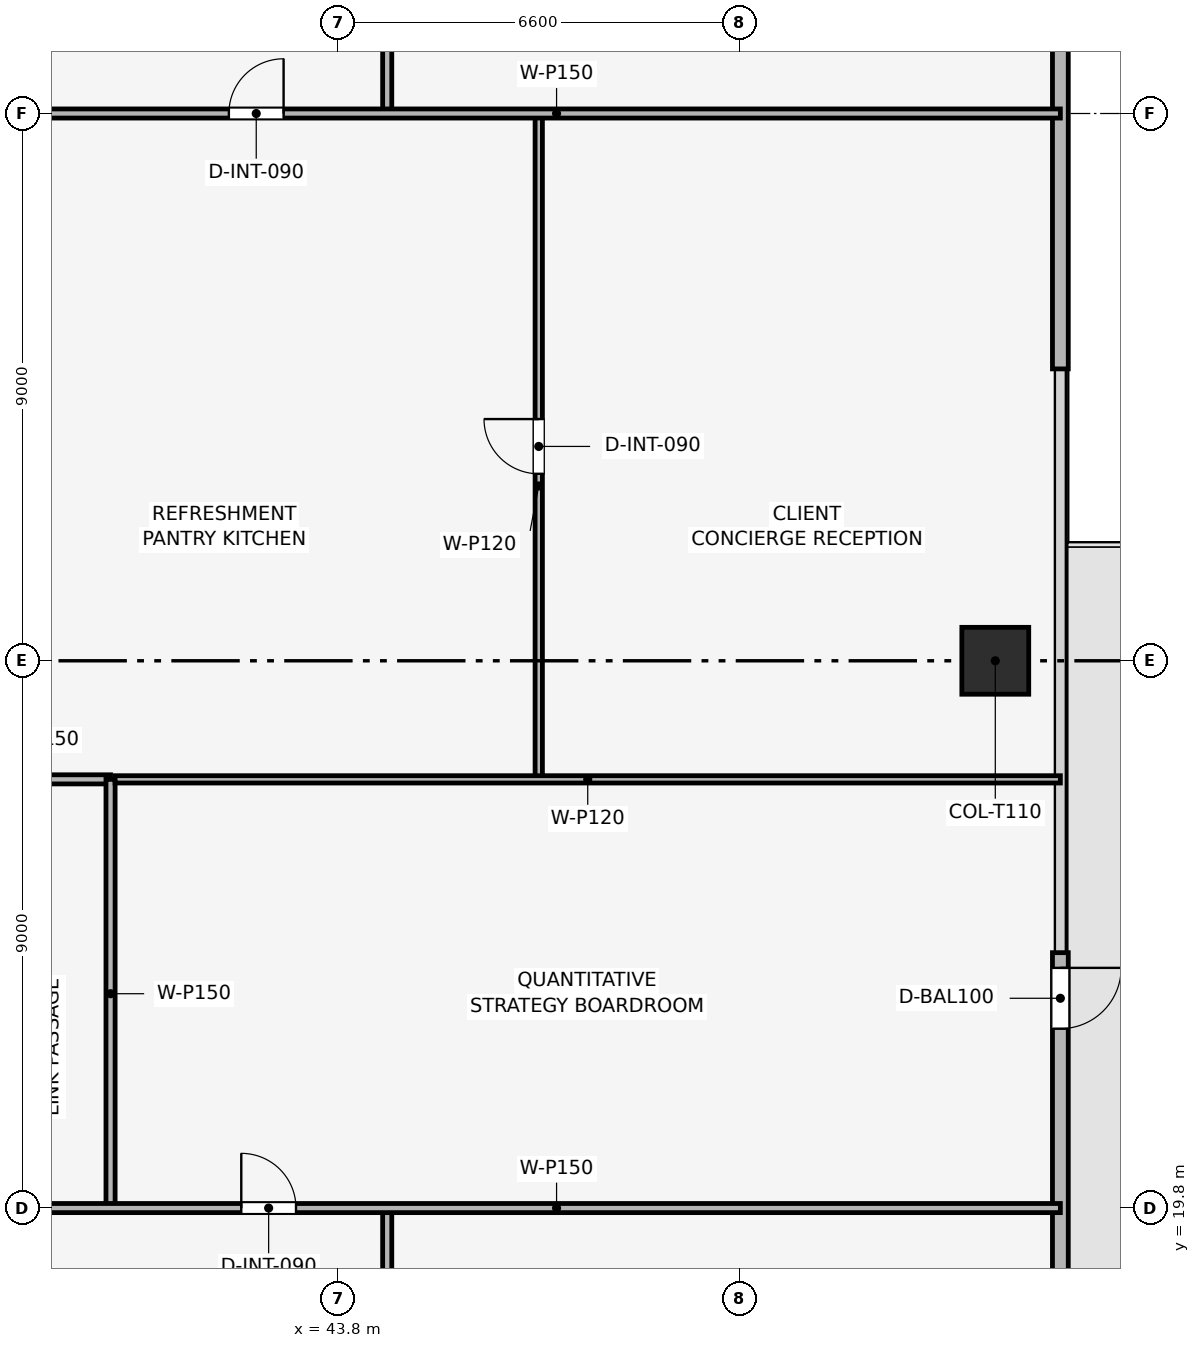
"""IFC4 building model, lengths in metres.
Left out: names, types, materials, properties, quantities, classifications, styles, units other than length and angle.
Written with IfcOpenShell. Run it as: python <this file> out.ifc"""

import sys

from ifc_helpers import new_model, si_unit, direction, frame, frame_2d, origin, origin_2d, place, context, subcontext, project, spatial, rectangle, extrude, element, fill, save


model = new_model("IFC4")
c1 = context("Model", 3, precision=1e-05, world=origin(), true_north=direction((0.0, 1.0)))
c2 = subcontext(c1, "Body", "Model", "MODEL_VIEW")
j1 = project(units=[si_unit("LENGTHUNIT", "METRE"), si_unit("PLANEANGLEUNIT", "RADIAN")], contexts=[c1])
p1 = place(None, origin())
s1 = spatial("IfcSite", under=j1, at=p1, CompositionType="ELEMENT")
p2 = place(p1, origin())
s2 = spatial("IfcBuilding", under=s1, at=p2, CompositionType="ELEMENT")
p3 = place(p2, frame((0.0, 0.0, 218.7)))
s3 = spatial("IfcBuildingStorey", under=s2, at=p3, CompositionType="ELEMENT", Elevation=218.7)
p4 = place(p3, frame((54.6, 28.8, 0.003), z_axis=(0.0, 0.0, 1.0), x_axis=(1.0, 0.0, 0.0)))
e1 = element("IfcColumn", 1, at=p4, inside=s3, PredefinedType="COLUMN", context=c2, shape_type="SweptSolid", body=[
    extrude(rectangle(XDim=1.1, YDim=1.1, at=origin_2d()), origin(), (0.0, 0.0, 1.0), 3.494),
])
p5 = place(p3, frame((55.67, 48.3, 0.0), z_axis=(0.0, 0.0, 1.0), x_axis=(0.0, -1.0, 0.0)))
e2 = element("IfcWall", 2, at=p5, inside=s3, PredefinedType="SOLIDWALL", context=c2, shape_type="SweptSolid", body=[
    extrude(rectangle(XDim=14.7, YDim=0.26, at=frame_2d((7.35, 0.0))), origin(), (0.0, 0.0, 1.0), 3.5),
])
p6 = place(p5, frame((0.25, 0.0, 0.9)))
e3 = element("IfcOpeningElement", 3, at=p6, cuts=e2, PredefinedType="OPENING", context=c2, shape_type="SweptSolid", body=[
    extrude(rectangle(XDim=3.8, YDim=1.9, at=frame_2d((1.9, 0.95))), frame((0.0, 0.14, 0.0), z_axis=(0.0, -1.0, 0.0), x_axis=(1.0, 0.0, 0.0)), (0.0, 0.0, 1.0), 0.28),
])
p7 = place(p3, frame((55.67, 24.0, 0.0), z_axis=(0.0, 0.0, 1.0), x_axis=(0.0, -1.0, 0.0)))
e4 = element("IfcWall", 4, at=p7, inside=s3, PredefinedType="SOLIDWALL", context=c2, shape_type="SweptSolid", body=[
    extrude(rectangle(XDim=14.7, YDim=0.26, at=frame_2d((7.35, 0.0))), origin(), (0.0, 0.0, 1.0), 3.5),
])
p8 = place(p7, frame((0.25, 0.0, 0.0)))
e5 = element("IfcOpeningElement", 5, at=p8, cuts=e4, PredefinedType="OPENING", context=c2, shape_type="SweptSolid", body=[
    extrude(rectangle(XDim=1.0, YDim=2.2, at=frame_2d((0.5, 1.1))), frame((0.0, 0.14, 0.0), z_axis=(0.0, -1.0, 0.0), x_axis=(1.0, 0.0, 0.0)), (0.0, 0.0, 1.0), 0.28),
])
p9 = place(p3, frame((37.8, 26.85, 0.0), z_axis=(0.0, 0.0, 1.0), x_axis=(1.0, 0.0, 0.0)))
e6 = element("IfcWall", 6, at=p9, inside=s3, PredefinedType="PARTITIONING", context=c2, shape_type="SweptSolid", body=[
    extrude(rectangle(XDim=2.25, YDim=0.15, at=frame_2d((1.125, 0.0))), origin(), (0.0, 0.0, 1.0), 3.5),
])
p10 = place(p3, frame((40.05, 19.8, 0.0), z_axis=(0.0, 0.0, 1.0), x_axis=(0.0, 1.0, 0.0)))
e7 = element("IfcWall", 7, at=p10, inside=s3, PredefinedType="PARTITIONING", context=c2, shape_type="SweptSolid", body=[
    extrude(rectangle(XDim=7.05, YDim=0.15, at=frame_2d((3.525, 0.0))), origin(), (0.0, 0.0, 1.0), 3.035),
])
p11 = place(p3, frame((47.092, 26.85, 0.0), z_axis=(0.0, 0.0, 1.0), x_axis=(0.0, 1.0, 0.0)))
e8 = element("IfcWall", 8, at=p11, inside=s3, PredefinedType="PARTITIONING", context=c2, shape_type="SweptSolid", body=[
    extrude(rectangle(XDim=10.95, YDim=0.12, at=frame_2d((5.475, 0.0))), origin(), (0.0, 0.0, 1.0), 3.035),
])
p12 = place(p11, frame((5.025, 0.0, 0.0)))
e9 = element("IfcOpeningElement", 9, at=p12, cuts=e8, PredefinedType="OPENING", context=c2, shape_type="SweptSolid", body=[
    extrude(rectangle(XDim=0.9, YDim=2.1, at=frame_2d((0.45, 1.05))), frame((0.0, 0.07, 0.0), z_axis=(0.0, -1.0, 0.0), x_axis=(1.0, 0.0, 0.0)), (0.0, 0.0, 1.0), 0.14),
])
p13 = place(p3, frame((40.125, 26.85, 0.0), z_axis=(0.0, 0.0, 1.0), x_axis=(1.0, 0.0, 0.0)))
e10 = element("IfcWall", 10, at=p13, inside=s3, PredefinedType="PARTITIONING", context=c2, shape_type="SweptSolid", body=[
    extrude(rectangle(XDim=15.545, YDim=0.12, at=frame_2d((7.772, 0.0))), origin(), (0.0, 0.0, 1.0), 2.885),
])
p14 = place(p3, frame((44.6, 17.4, 0.0), z_axis=(0.0, 0.0, 1.0), x_axis=(0.0, 1.0, 0.0)))
e11 = element("IfcWall", 11, at=p14, inside=s3, PredefinedType="PARTITIONING", context=c2, shape_type="SweptSolid", body=[
    extrude(rectangle(XDim=2.4, YDim=0.15, at=frame_2d((1.2, 0.0))), origin(), (0.0, 0.0, 1.0), 3.5),
])
p15 = place(p3, frame((44.6, 37.8, 0.0), z_axis=(0.0, 0.0, 1.0), x_axis=(0.0, 1.0, 0.0)))
e12 = element("IfcWall", 12, at=p15, inside=s3, PredefinedType="PARTITIONING", context=c2, shape_type="SweptSolid", body=[
    extrude(rectangle(XDim=2.4, YDim=0.15, at=frame_2d((1.2, 0.0))), origin(), (0.0, 0.0, 1.0), 3.5),
])
p16 = place(p3, frame((37.8, 19.8, 0.0), z_axis=(0.0, 0.0, 1.0), x_axis=(1.0, 0.0, 0.0)))
e13 = element("IfcWall", 13, at=p16, inside=s3, PredefinedType="PARTITIONING", context=c2, shape_type="SweptSolid", body=[
    extrude(rectangle(XDim=17.87, YDim=0.15, at=frame_2d((8.935, 0.0))), origin(), (0.0, 0.0, 1.0), 2.885),
])
p17 = place(p16, frame((4.4, 0.0, 0.0)))
e14 = element("IfcOpeningElement", 14, at=p17, cuts=e13, PredefinedType="OPENING", context=c2, shape_type="SweptSolid", body=[
    extrude(rectangle(XDim=0.9, YDim=2.1, at=frame_2d((0.45, 1.05))), frame((0.0, 0.085, 0.0), z_axis=(0.0, -1.0, 0.0), x_axis=(1.0, 0.0, 0.0)), (0.0, 0.0, 1.0), 0.17),
])
p18 = place(p3, frame((37.8, 37.8, 0.0), z_axis=(0.0, 0.0, 1.0), x_axis=(1.0, 0.0, 0.0)))
e15 = element("IfcWall", 15, at=p18, inside=s3, PredefinedType="PARTITIONING", context=c2, shape_type="SweptSolid", body=[
    extrude(rectangle(XDim=17.87, YDim=0.15, at=frame_2d((8.935, 0.0))), origin(), (0.0, 0.0, 1.0), 2.885),
])
p19 = place(p18, frame((4.196, 0.0, 0.0)))
e16 = element("IfcOpeningElement", 16, at=p19, cuts=e15, PredefinedType="OPENING", context=c2, shape_type="SweptSolid", body=[
    extrude(rectangle(XDim=0.9, YDim=2.1, at=frame_2d((0.45, 1.05))), frame((0.0, 0.085, 0.0), z_axis=(0.0, -1.0, 0.0), x_axis=(1.0, 0.0, 0.0)), (0.0, 0.0, 1.0), 0.17),
])
p20 = place(p8, origin())
e17 = element("IfcDoor", 17, at=p20, inside=s3, OperationType="SINGLE_SWING_LEFT", PredefinedType="DOOR", context=c2, shape_type="SweptSolid", body=[
    extrude(rectangle(XDim=1.0, YDim=2.2, at=frame_2d((0.5, 1.1))), frame((0.0, 0.025, 0.0), z_axis=(0.0, -1.0, 0.0), x_axis=(1.0, 0.0, 0.0)), (0.0, 0.0, 1.0), 0.05),
])
fill(e5, e17)
p21 = place(p12, origin())
e18 = element("IfcDoor", 18, at=p21, inside=s3, OperationType="SINGLE_SWING_RIGHT", PredefinedType="DOOR", context=c2, shape_type="SweptSolid", body=[
    extrude(rectangle(XDim=0.9, YDim=2.1, at=frame_2d((0.45, 1.05))), frame((0.0, 0.025, 0.0), z_axis=(0.0, -1.0, 0.0), x_axis=(1.0, 0.0, 0.0)), (0.0, 0.0, 1.0), 0.05),
])
fill(e9, e18)
p22 = place(p17, origin())
e19 = element("IfcDoor", 19, at=p22, inside=s3, OperationType="SINGLE_SWING_LEFT", PredefinedType="DOOR", context=c2, shape_type="SweptSolid", body=[
    extrude(rectangle(XDim=0.9, YDim=2.1, at=frame_2d((0.45, 1.05))), frame((0.0, 0.025, 0.0), z_axis=(0.0, -1.0, 0.0), x_axis=(1.0, 0.0, 0.0)), (0.0, 0.0, 1.0), 0.05),
])
fill(e14, e19)
p23 = place(p19, origin())
e20 = element("IfcDoor", 20, at=p23, inside=s3, OperationType="SINGLE_SWING_RIGHT", PredefinedType="DOOR", context=c2, shape_type="SweptSolid", body=[
    extrude(rectangle(XDim=0.9, YDim=2.1, at=frame_2d((0.45, 1.05))), frame((0.0, 0.025, 0.0), z_axis=(0.0, -1.0, 0.0), x_axis=(1.0, 0.0, 0.0)), (0.0, 0.0, 1.0), 0.05),
])
fill(e16, e20)
save(model, sys.argv[1])
